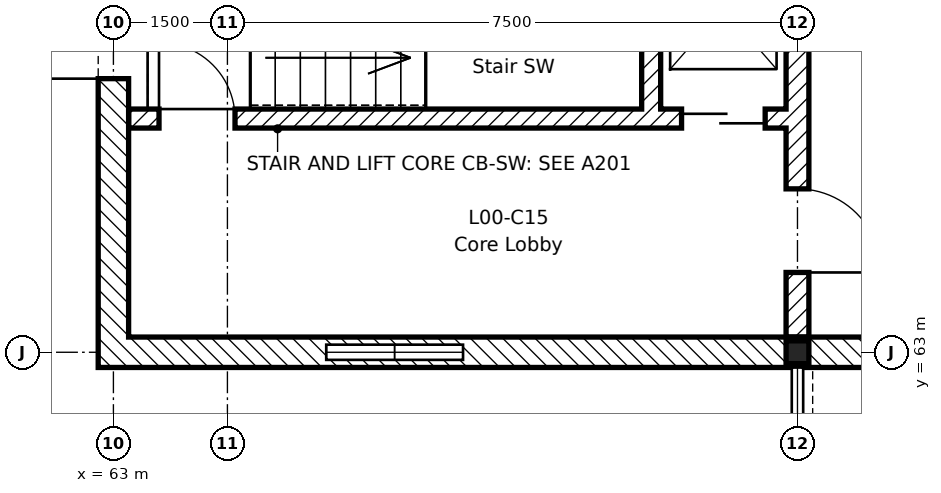
"""IFC4 building model, lengths in metres.
Left out: names, types, materials, properties, quantities, classifications, styles, units other than length and angle.
Written with IfcOpenShell. Run it as: python <this file> out.ifc"""

import sys

from ifc_helpers import new_model, si_unit, direction, frame, frame_2d, origin, origin_2d, place, context, subcontext, project, spatial, rectangle, i_section, extrude, element, fill, save


model = new_model("IFC4")
c1 = context("Model", 3, precision=1e-05, world=origin(), true_north=direction((0.0, 1.0)))
c2 = subcontext(c1, "Body", "Model", "MODEL_VIEW")
j1 = project(units=[si_unit("LENGTHUNIT", "METRE"), si_unit("PLANEANGLEUNIT", "RADIAN")], contexts=[c1])
p1 = place(None, origin())
s1 = spatial("IfcSite", under=j1, at=p1, CompositionType="ELEMENT")
p2 = place(p1, origin())
s2 = spatial("IfcBuilding", under=s1, at=p2, CompositionType="ELEMENT")
p3 = place(p2, origin())
s3 = spatial("IfcBuildingStorey", under=s2, at=p3, CompositionType="ELEMENT", Elevation=0.0)
p4 = place(p3, frame((72.0, 63.0, -0.6), z_axis=(0.0, 0.0, 1.0), x_axis=(1.0, 0.0, 0.0)))
e1 = element("IfcColumn", 1, at=p4, inside=s3, PredefinedType="COLUMN", context=c2, shape_type="SweptSolid", body=[
    extrude(i_section(OverallWidth=0.3, OverallDepth=0.3, WebThickness=0.011, FlangeThickness=0.019, FilletRadius=0.027, at=origin_2d()), origin(), (0.0, 0.0, 1.0), 5.8),
])
p5 = place(p3, frame((72.0, 63.2, 0.0), z_axis=(0.0, 0.0, 1.0), x_axis=(0.0, 1.0, 0.0)))
e2 = element("IfcWall", 2, at=p5, inside=s3, PredefinedType="SHEAR", context=c2, shape_type="SweptSolid", body=[
    extrude(rectangle(XDim=8.95, YDim=0.3, at=frame_2d((4.475, 0.0))), origin(), (0.0, 0.0, 1.0), 5.2),
])
p6 = place(p5, frame((0.85, 0.0, 0.0)))
e3 = element("IfcOpeningElement", 3, at=p6, cuts=e2, PredefinedType="OPENING", context=c2, shape_type="SweptSolid", body=[
    extrude(rectangle(XDim=1.1, YDim=2.1, at=frame_2d((0.55, 1.05))), frame((0.0, 0.16, 0.0), z_axis=(0.0, -1.0, 0.0), x_axis=(1.0, 0.0, 0.0)), (0.0, 0.0, 1.0), 0.32),
])
p7 = place(p3, frame((63.2, 66.075, 0.0), z_axis=(0.0, 0.0, 1.0), x_axis=(1.0, 0.0, 0.0)))
e4 = element("IfcWall", 4, at=p7, inside=s3, PredefinedType="SHEAR", context=c2, shape_type="SweptSolid", body=[
    extrude(rectangle(XDim=8.65, YDim=0.25, at=frame_2d((4.325, 0.0))), origin(), (0.0, 0.0, 1.0), 5.2),
])
p8 = place(p7, frame((0.4, 0.0, 0.0)))
e5 = element("IfcOpeningElement", 5, at=p8, cuts=e4, PredefinedType="OPENING", context=c2, shape_type="SweptSolid", body=[
    extrude(rectangle(XDim=1.0, YDim=2.1, at=frame_2d((0.5, 1.05))), frame((0.0, 0.135, 0.0), z_axis=(0.0, -1.0, 0.0), x_axis=(1.0, 0.0, 0.0)), (0.0, 0.0, 1.0), 0.27),
])
p9 = place(p7, frame((7.275, 0.0, 0.0)))
e6 = element("IfcOpeningElement", 6, at=p9, cuts=e4, PredefinedType="OPENING", context=c2, shape_type="SweptSolid", body=[
    extrude(rectangle(XDim=1.1, YDim=2.1, at=frame_2d((0.55, 1.05))), frame((0.0, 0.135, 0.0), z_axis=(0.0, -1.0, 0.0), x_axis=(1.0, 0.0, 0.0)), (0.0, 0.0, 1.0), 0.27),
])
p10 = place(p3, frame((70.075, 66.2, 0.0), z_axis=(0.0, 0.0, 1.0), x_axis=(0.0, 1.0, 0.0)))
e7 = element("IfcWall", 7, at=p10, inside=s3, PredefinedType="SHEAR", context=c2, shape_type="SweptSolid", body=[
    extrude(rectangle(XDim=2.85, YDim=0.25, at=frame_2d((1.425, 0.0))), origin(), (0.0, 0.0, 1.0), 5.2),
])
p11 = place(p3, frame((62.8, 63.0, 0.0), z_axis=(0.0, 0.0, 1.0), x_axis=(1.0, 0.0, 0.0)))
e8 = element("IfcWall", 8, at=p11, inside=s3, PredefinedType="STANDARD", context=c2, shape_type="SweptSolid", body=[
    extrude(rectangle(XDim=3.0, YDim=0.4, at=frame_2d((1.5, 0.0))), origin(), (0.0, 0.0, 1.0), 5.2),
])
p12 = place(p3, frame((67.6, 63.0, 0.0), z_axis=(0.0, 0.0, 1.0), x_axis=(1.0, 0.0, 0.0)))
e9 = element("IfcWall", 9, at=p12, inside=s3, PredefinedType="STANDARD", context=c2, shape_type="SweptSolid", body=[
    extrude(rectangle(XDim=4.4, YDim=0.4, at=frame_2d((2.2, 0.0))), origin(), (0.0, 0.0, 1.0), 5.2),
])
p13 = place(p3, frame((65.8, 63.0, 0.0), z_axis=(0.0, 0.0, 1.0), x_axis=(1.0, 0.0, 0.0)))
e10 = element("IfcWall", 10, at=p13, inside=s3, PredefinedType="STANDARD", context=c2, shape_type="SweptSolid", body=[
    extrude(rectangle(XDim=1.8, YDim=0.4, at=frame_2d((0.9, 0.0))), origin(), (0.0, 0.0, 1.0), 0.9),
])
p14 = place(p3, frame((72.0, 63.0, 0.0), z_axis=(0.0, 0.0, 1.0), x_axis=(1.0, 0.0, 0.0)))
e11 = element("IfcWall", 11, at=p14, inside=s3, PredefinedType="STANDARD", context=c2, shape_type="SweptSolid", body=[
    extrude(rectangle(XDim=27.0, YDim=0.4, at=frame_2d((13.5, 0.0))), origin(), (0.0, 0.0, 1.0), 4.71),
])
p15 = place(p14, frame((3.3, 0.0, 0.0)))
e12 = element("IfcOpeningElement", 12, at=p15, cuts=e11, PredefinedType="OPENING", context=c2, shape_type="SweptSolid", body=[
    extrude(rectangle(XDim=2.4, YDim=2.4, at=frame_2d((1.2, 1.2))), frame((0.0, 0.21, 0.0), z_axis=(0.0, -1.0, 0.0), x_axis=(1.0, 0.0, 0.0)), (0.0, 0.0, 1.0), 0.42),
])
p16 = place(p14, frame((12.3, 0.0, 0.0)))
e13 = element("IfcOpeningElement", 13, at=p16, cuts=e11, PredefinedType="OPENING", context=c2, shape_type="SweptSolid", body=[
    extrude(rectangle(XDim=2.4, YDim=2.4, at=frame_2d((1.2, 1.2))), frame((0.0, 0.21, 0.0), z_axis=(0.0, -1.0, 0.0), x_axis=(1.0, 0.0, 0.0)), (0.0, 0.0, 1.0), 0.42),
])
p17 = place(p14, frame((21.3, 0.0, 0.0)))
e14 = element("IfcOpeningElement", 14, at=p17, cuts=e11, PredefinedType="OPENING", context=c2, shape_type="SweptSolid", body=[
    extrude(rectangle(XDim=2.4, YDim=2.4, at=frame_2d((1.2, 1.2))), frame((0.0, 0.21, 0.0), z_axis=(0.0, -1.0, 0.0), x_axis=(1.0, 0.0, 0.0)), (0.0, 0.0, 1.0), 0.42),
])
p18 = place(p3, frame((63.0, 63.2, 0.0), z_axis=(0.0, 0.0, 1.0), x_axis=(0.0, 1.0, 0.0)))
e15 = element("IfcWall", 15, at=p18, inside=s3, PredefinedType="STANDARD", context=c2, shape_type="SweptSolid", body=[
    extrude(rectangle(XDim=8.8, YDim=0.4, at=frame_2d((4.4, 0.0))), origin(), (0.0, 0.0, 1.0), 5.2),
])
p19 = place(p18, frame((3.4, 0.0, 0.0)))
e16 = element("IfcOpeningElement", 16, at=p19, cuts=e15, PredefinedType="OPENING", context=c2, shape_type="SweptSolid", body=[
    extrude(rectangle(XDim=1.8, YDim=2.1, at=frame_2d((0.9, 1.05))), frame((0.0, 0.21, 0.0), z_axis=(0.0, -1.0, 0.0), x_axis=(1.0, 0.0, 0.0)), (0.0, 0.0, 1.0), 0.42),
])
p20 = place(p19, origin())
e17 = element("IfcDoor", 17, at=p20, inside=s3, OperationType="DOUBLE_DOOR_SINGLE_SWING", PredefinedType="DOOR", context=c2, shape_type="SweptSolid", body=[
    extrude(rectangle(XDim=1.8, YDim=2.1, at=frame_2d((0.9, 1.05))), frame((0.0, 0.025, 0.0), z_axis=(0.0, -1.0, 0.0), x_axis=(1.0, 0.0, 0.0)), (0.0, 0.0, 1.0), 0.05),
])
fill(e16, e17)
p21 = place(p8, origin())
e18 = element("IfcDoor", 18, at=p21, inside=s3, OperationType="SINGLE_SWING_LEFT", PredefinedType="DOOR", context=c2, shape_type="SweptSolid", body=[
    extrude(rectangle(XDim=1.0, YDim=2.1, at=frame_2d((0.5, 1.05))), frame((0.0, 0.025, 0.0), z_axis=(0.0, -1.0, 0.0), x_axis=(1.0, 0.0, 0.0)), (0.0, 0.0, 1.0), 0.05),
])
fill(e5, e18)
p22 = place(p6, frame((1.1, 0.0, 0.0), z_axis=(0.0, 0.0, 1.0), x_axis=(-1.0, 0.0, 0.0)))
e19 = element("IfcDoor", 19, at=p22, inside=s3, OperationType="SINGLE_SWING_RIGHT", PredefinedType="DOOR", context=c2, shape_type="SweptSolid", body=[
    extrude(rectangle(XDim=1.1, YDim=2.1, at=frame_2d((0.55, 1.05))), frame((0.0, 0.025, 0.0), z_axis=(0.0, -1.0, 0.0), x_axis=(1.0, 0.0, 0.0)), (0.0, 0.0, 1.0), 0.05),
])
fill(e3, e19)
p23 = place(p9, frame((1.1, 0.0, 0.0), z_axis=(0.0, 0.0, 1.0), x_axis=(-1.0, 0.0, 0.0)))
e20 = element("IfcDoor", 20, at=p23, inside=s3, OperationType="SLIDING_TO_LEFT", PredefinedType="DOOR", context=c2, shape_type="SweptSolid", body=[
    extrude(rectangle(XDim=1.1, YDim=2.1, at=frame_2d((0.55, 1.05))), frame((0.0, 0.025, 0.0), z_axis=(0.0, -1.0, 0.0), x_axis=(1.0, 0.0, 0.0)), (0.0, 0.0, 1.0), 0.05),
])
fill(e6, e20)
save(model, sys.argv[1])
